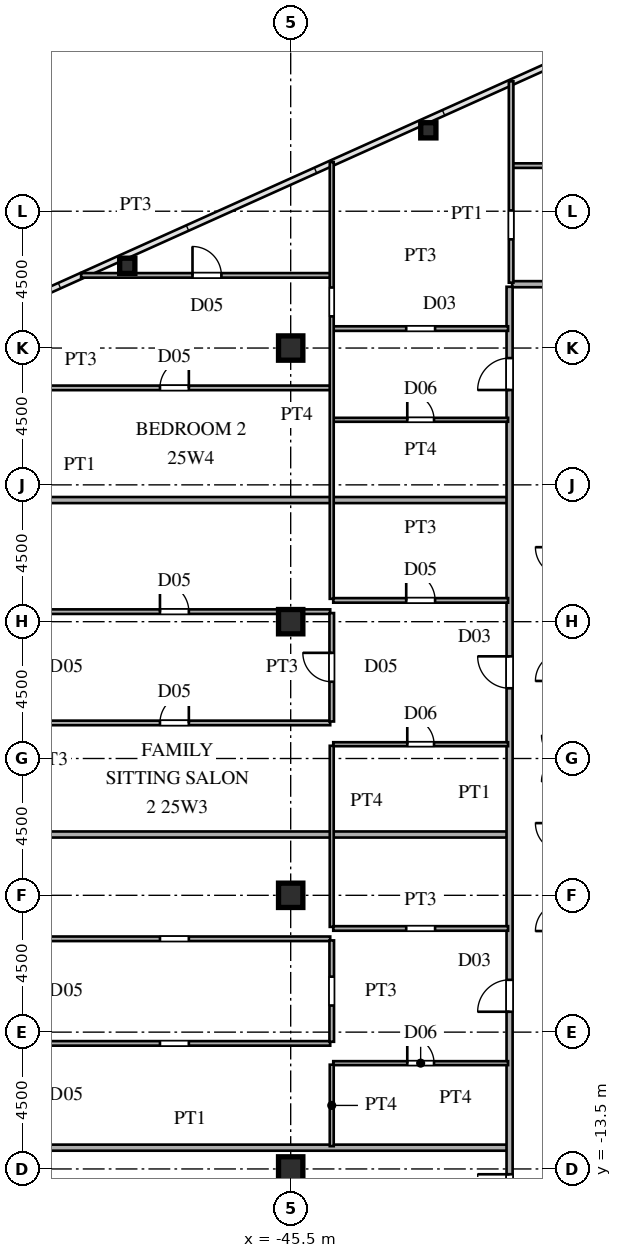
"""IFC4 building model, lengths in metres.
Left out: names, types, materials, properties, quantities, classifications, styles, units other than length and angle.
Written with IfcOpenShell. Run it as: python <this file> out.ifc"""

import sys

from ifc_helpers import new_model, si_unit, direction, frame, frame_2d, origin, origin_2d, place, context, subcontext, project, spatial, rectangle, hollow_rectangle, i_section, extrude, source, transform, mapped, element, fill, save


model = new_model("IFC4")
c1 = context("Model", 3, precision=1e-05, world=origin(), true_north=direction((0.0, 1.0)))
c2 = subcontext(c1, "Body", "Model", "MODEL_VIEW")
j1 = project(units=[si_unit("LENGTHUNIT", "METRE"), si_unit("PLANEANGLEUNIT", "RADIAN")], contexts=[c1])
p1 = place(None, origin())
s1 = spatial("IfcSite", under=j1, at=p1, CompositionType="ELEMENT")
p2 = place(p1, origin())
s2 = spatial("IfcBuilding", under=s1, at=p2, CompositionType="ELEMENT")
p3 = place(p2, frame((0.0, 0.0, 96.0)))
s3 = spatial("IfcBuildingStorey", under=s2, at=p3, CompositionType="ELEMENT", Elevation=96.0)
m1 = source(origin(), c2, "Body", "SweptSolid", [
    extrude(i_section(OverallWidth=0.8, OverallDepth=0.8, WebThickness=0.032, FlangeThickness=0.05, at=origin_2d()), origin(), (0.0, 0.0, 1.0), 3.6),
])
for number, where, z_axis, x_axis in (
    (1, (-45.5, -13.5, 0.0), (0.0, 0.0, 1.0), (1.0, 0.0, 0.0)),
    (2, (-45.5, -4.5, 0.0), (0.0, 0.0, 1.0), (1.0, 0.0, 0.0)),
    (3, (-45.5, 4.5, 0.0), (0.0, 0.0, 1.0), (1.0, 0.0, 0.0)),
    (4, (-45.5, 13.5, 0.0), (0.0, 0.0, 1.0), (1.0, 0.0, 0.0)),
):
    element("IfcColumn", number, at=place(p3, frame(where, z_axis=z_axis, x_axis=x_axis)), inside=s3, PredefinedType="COLUMN", context=c2, shape_type="MappedRepresentation", body=[
        mapped(m1, transform((0.0, 0.0, 0.0), scale=1.0)),
    ])
m2 = source(origin(), c2, "Body", "SweptSolid", [
    extrude(hollow_rectangle(XDim=0.5, YDim=0.5, WallThickness=0.02, at=origin_2d()), origin(), (0.0, 0.0, 1.0), 3.6),
])
for number, where, z_axis, x_axis in (
    (5, (-40.973, 20.661, 0.0), (0.0, 0.0, 1.0), (1.0, 0.0, 0.0)),
    (6, (-50.875, 16.205, 0.0), (0.0, 0.0, 1.0), (1.0, 0.0, 0.0)),
):
    element("IfcColumn", number, at=place(p3, frame(where, z_axis=z_axis, x_axis=x_axis)), inside=s3, PredefinedType="COLUMN", context=c2, shape_type="MappedRepresentation", body=[
        mapped(m2, transform((0.0, 0.0, 0.0), scale=1.0)),
    ])
p4 = place(p3, frame((-59.234, -12.8, 0.0), z_axis=(0.0, 0.0, 1.0), x_axis=(1.0, 0.0, 0.0)))
e7 = element("IfcWall", 7, at=p4, inside=s3, PredefinedType="PARTITIONING", context=c2, shape_type="SweptSolid", body=[
    extrude(rectangle(XDim=20.854, YDim=0.2, at=frame_2d((10.427, 0.0))), origin(), (0.0, 0.0, 1.0), 3.38),
])
p5 = place(p3, frame((-44.1, -10.02, 0.0), z_axis=(0.0, 0.0, 1.0), x_axis=(1.0, 0.0, 0.0)))
e8 = element("IfcWall", 8, at=p5, inside=s3, PredefinedType="PARTITIONING", context=c2, shape_type="SweptSolid", body=[
    extrude(rectangle(XDim=5.75, YDim=0.13, at=frame_2d((2.875, 0.0))), origin(), (0.0, 0.0, 1.0), 3.38),
])
p6 = place(p5, frame((2.435, 0.0, 0.0)))
e9 = element("IfcOpeningElement", 9, at=p6, cuts=e8, PredefinedType="OPENING", context=c2, shape_type="SweptSolid", body=[
    extrude(rectangle(XDim=0.88, YDim=2.1, at=frame_2d((0.44, 1.05))), frame((0.0, 0.075, 0.0), z_axis=(0.0, -1.0, 0.0), x_axis=(1.0, 0.0, 0.0)), (0.0, 0.0, 1.0), 0.15),
])
p7 = place(p3, frame((-66.887, -9.37, 0.0), z_axis=(0.0, 0.0, 1.0), x_axis=(1.0, 0.0, 0.0)))
e10 = element("IfcWall", 10, at=p7, inside=s3, PredefinedType="PARTITIONING", context=c2, shape_type="SweptSolid", body=[
    extrude(rectangle(XDim=22.687, YDim=0.15, at=frame_2d((11.344, 0.0))), origin(), (0.0, 0.0, 1.0), 3.38),
])
p8 = place(p7, frame((17.087, 0.0, 0.0)))
e11 = element("IfcOpeningElement", 11, at=p8, cuts=e10, PredefinedType="OPENING", context=c2, shape_type="SweptSolid", body=[
    extrude(rectangle(XDim=0.95, YDim=2.15, at=frame_2d((0.475, 1.075))), frame((0.0, 0.085, 0.0), z_axis=(0.0, -1.0, 0.0), x_axis=(1.0, 0.0, 0.0)), (0.0, 0.0, 1.0), 0.17),
])
p9 = place(p3, frame((-71.035, -5.93, 0.0), z_axis=(0.0, 0.0, 1.0), x_axis=(1.0, 0.0, 0.0)))
e12 = element("IfcWall", 12, at=p9, inside=s3, PredefinedType="PARTITIONING", context=c2, shape_type="SweptSolid", body=[
    extrude(rectangle(XDim=26.835, YDim=0.15, at=frame_2d((13.417, 0.0))), origin(), (0.0, 0.0, 1.0), 3.38),
])
p10 = place(p9, frame((21.235, 0.0, 0.0)))
e13 = element("IfcOpeningElement", 13, at=p10, cuts=e12, PredefinedType="OPENING", context=c2, shape_type="SweptSolid", body=[
    extrude(rectangle(XDim=0.95, YDim=2.15, at=frame_2d((0.475, 1.075))), frame((0.0, 0.085, 0.0), z_axis=(0.0, -1.0, 0.0), x_axis=(1.0, 0.0, 0.0)), (0.0, 0.0, 1.0), 0.17),
])
p11 = place(p3, frame((-44.1, -5.59, 0.0), z_axis=(0.0, 0.0, 1.0), x_axis=(1.0, 0.0, 0.0)))
e14 = element("IfcWall", 14, at=p11, inside=s3, PredefinedType="PARTITIONING", context=c2, shape_type="SweptSolid", body=[
    extrude(rectangle(XDim=5.75, YDim=0.15, at=frame_2d((2.875, 0.0))), origin(), (0.0, 0.0, 1.0), 3.38),
])
p12 = place(p11, frame((2.4, 0.0, 0.0)))
e15 = element("IfcOpeningElement", 15, at=p12, cuts=e14, PredefinedType="OPENING", context=c2, shape_type="SweptSolid", body=[
    extrude(rectangle(XDim=0.95, YDim=2.15, at=frame_2d((0.475, 1.075))), frame((0.0, 0.085, 0.0), z_axis=(0.0, -1.0, 0.0), x_axis=(1.0, 0.0, 0.0)), (0.0, 0.0, 1.0), 0.17),
])
p13 = place(p3, frame((-71.005, -2.5, 0.0), z_axis=(0.0, 0.0, 1.0), x_axis=(1.0, 0.0, 0.0)))
e16 = element("IfcWall", 16, at=p13, inside=s3, PredefinedType="PARTITIONING", context=c2, shape_type="SweptSolid", body=[
    extrude(rectangle(XDim=32.625, YDim=0.2, at=frame_2d((16.312, 0.0))), origin(), (0.0, 0.0, 1.0), 3.38),
])
p14 = place(p3, frame((-44.1, 0.47, 0.0), z_axis=(0.0, 0.0, 1.0), x_axis=(1.0, 0.0, 0.0)))
e17 = element("IfcWall", 17, at=p14, inside=s3, PredefinedType="PARTITIONING", context=c2, shape_type="SweptSolid", body=[
    extrude(rectangle(XDim=5.75, YDim=0.13, at=frame_2d((2.875, 0.0))), origin(), (0.0, 0.0, 1.0), 3.38),
])
p15 = place(p14, frame((2.435, 0.0, 0.0)))
e18 = element("IfcOpeningElement", 18, at=p15, cuts=e17, PredefinedType="OPENING", context=c2, shape_type="SweptSolid", body=[
    extrude(rectangle(XDim=0.88, YDim=2.1, at=frame_2d((0.44, 1.05))), frame((0.0, 0.075, 0.0), z_axis=(0.0, -1.0, 0.0), x_axis=(1.0, 0.0, 0.0)), (0.0, 0.0, 1.0), 0.15),
])
p16 = place(p3, frame((-71.035, 1.17, 0.0), z_axis=(0.0, 0.0, 1.0), x_axis=(1.0, 0.0, 0.0)))
e19 = element("IfcWall", 19, at=p16, inside=s3, PredefinedType="PARTITIONING", context=c2, shape_type="SweptSolid", body=[
    extrude(rectangle(XDim=26.835, YDim=0.15, at=frame_2d((13.417, 0.0))), origin(), (0.0, 0.0, 1.0), 3.38),
])
p17 = place(p16, frame((21.235, 0.0, 0.0)))
e20 = element("IfcOpeningElement", 20, at=p17, cuts=e19, PredefinedType="OPENING", context=c2, shape_type="SweptSolid", body=[
    extrude(rectangle(XDim=0.95, YDim=2.15, at=frame_2d((0.475, 1.075))), frame((0.0, 0.085, 0.0), z_axis=(0.0, -1.0, 0.0), x_axis=(1.0, 0.0, 0.0)), (0.0, 0.0, 1.0), 0.17),
])
p18 = place(p16, frame((13.21, 0.0, 0.0)))
e21 = element("IfcOpeningElement", 21, at=p18, cuts=e19, PredefinedType="OPENING", context=c2, shape_type="SweptSolid", body=[
    extrude(rectangle(XDim=0.95, YDim=2.15, at=frame_2d((0.475, 1.075))), frame((0.0, 0.085, 0.0), z_axis=(0.0, -1.0, 0.0), x_axis=(1.0, 0.0, 0.0)), (0.0, 0.0, 1.0), 0.17),
])
p19 = place(p3, frame((-71.035, 4.83, 0.0), z_axis=(0.0, 0.0, 1.0), x_axis=(1.0, 0.0, 0.0)))
e22 = element("IfcWall", 22, at=p19, inside=s3, PredefinedType="PARTITIONING", context=c2, shape_type="SweptSolid", body=[
    extrude(rectangle(XDim=26.835, YDim=0.15, at=frame_2d((13.417, 0.0))), origin(), (0.0, 0.0, 1.0), 3.38),
])
p20 = place(p19, frame((21.235, 0.0, 0.0)))
e23 = element("IfcOpeningElement", 23, at=p20, cuts=e22, PredefinedType="OPENING", context=c2, shape_type="SweptSolid", body=[
    extrude(rectangle(XDim=0.95, YDim=2.15, at=frame_2d((0.475, 1.075))), frame((0.0, 0.085, 0.0), z_axis=(0.0, -1.0, 0.0), x_axis=(1.0, 0.0, 0.0)), (0.0, 0.0, 1.0), 0.17),
])
p21 = place(p19, frame((13.21, 0.0, 0.0)))
e24 = element("IfcOpeningElement", 24, at=p21, cuts=e22, PredefinedType="OPENING", context=c2, shape_type="SweptSolid", body=[
    extrude(rectangle(XDim=0.95, YDim=2.15, at=frame_2d((0.475, 1.075))), frame((0.0, 0.085, 0.0), z_axis=(0.0, -1.0, 0.0), x_axis=(1.0, 0.0, 0.0)), (0.0, 0.0, 1.0), 0.17),
])
p22 = place(p3, frame((-44.1, 5.2, 0.0), z_axis=(0.0, 0.0, 1.0), x_axis=(1.0, 0.0, 0.0)))
e25 = element("IfcWall", 25, at=p22, inside=s3, PredefinedType="PARTITIONING", context=c2, shape_type="SweptSolid", body=[
    extrude(rectangle(XDim=5.75, YDim=0.15, at=frame_2d((2.875, 0.0))), origin(), (0.0, 0.0, 1.0), 3.38),
])
p23 = place(p22, frame((2.4, 0.0, 0.0)))
e26 = element("IfcOpeningElement", 26, at=p23, cuts=e25, PredefinedType="OPENING", context=c2, shape_type="SweptSolid", body=[
    extrude(rectangle(XDim=0.95, YDim=2.15, at=frame_2d((0.475, 1.075))), frame((0.0, 0.085, 0.0), z_axis=(0.0, -1.0, 0.0), x_axis=(1.0, 0.0, 0.0)), (0.0, 0.0, 1.0), 0.17),
])
p24 = place(p3, frame((-68.79, 8.5, 0.0), z_axis=(0.0, 0.0, 1.0), x_axis=(1.0, 0.0, 0.0)))
e27 = element("IfcWall", 27, at=p24, inside=s3, PredefinedType="PARTITIONING", context=c2, shape_type="SweptSolid", body=[
    extrude(rectangle(XDim=30.41, YDim=0.2, at=frame_2d((15.205, 0.0))), origin(), (0.0, 0.0, 1.0), 3.38),
])
p25 = place(p3, frame((-44.1, 11.14, 0.0), z_axis=(0.0, 0.0, 1.0), x_axis=(1.0, 0.0, 0.0)))
e28 = element("IfcWall", 28, at=p25, inside=s3, PredefinedType="PARTITIONING", context=c2, shape_type="SweptSolid", body=[
    extrude(rectangle(XDim=5.75, YDim=0.13, at=frame_2d((2.875, 0.0))), origin(), (0.0, 0.0, 1.0), 3.38),
])
p26 = place(p25, frame((2.435, 0.0, 0.0)))
e29 = element("IfcOpeningElement", 29, at=p26, cuts=e28, PredefinedType="OPENING", context=c2, shape_type="SweptSolid", body=[
    extrude(rectangle(XDim=0.88, YDim=2.1, at=frame_2d((0.44, 1.05))), frame((0.0, 0.075, 0.0), z_axis=(0.0, -1.0, 0.0), x_axis=(1.0, 0.0, 0.0)), (0.0, 0.0, 1.0), 0.15),
])
p27 = place(p3, frame((-60.603, 12.19, 0.0), z_axis=(0.0, 0.0, 1.0), x_axis=(1.0, 0.0, 0.0)))
e30 = element("IfcWall", 30, at=p27, inside=s3, PredefinedType="PARTITIONING", context=c2, shape_type="SweptSolid", body=[
    extrude(rectangle(XDim=16.403, YDim=0.15, at=frame_2d((8.202, 0.0))), origin(), (0.0, 0.0, 1.0), 3.38),
])
p28 = place(p27, frame((10.803, 0.0, 0.0)))
e31 = element("IfcOpeningElement", 31, at=p28, cuts=e30, PredefinedType="OPENING", context=c2, shape_type="SweptSolid", body=[
    extrude(rectangle(XDim=0.95, YDim=2.15, at=frame_2d((0.475, 1.075))), frame((0.0, 0.085, 0.0), z_axis=(0.0, -1.0, 0.0), x_axis=(1.0, 0.0, 0.0)), (0.0, 0.0, 1.0), 0.17),
])
p29 = place(p27, frame((2.594, 0.0, 0.0)))
e32 = element("IfcOpeningElement", 32, at=p29, cuts=e30, PredefinedType="OPENING", context=c2, shape_type="SweptSolid", body=[
    extrude(rectangle(XDim=0.95, YDim=2.15, at=frame_2d((0.475, 1.075))), frame((0.0, 0.085, 0.0), z_axis=(0.0, -1.0, 0.0), x_axis=(1.0, 0.0, 0.0)), (0.0, 0.0, 1.0), 0.17),
])
p30 = place(p3, frame((-44.1, 14.14, 0.0), z_axis=(0.0, 0.0, 1.0), x_axis=(1.0, 0.0, 0.0)))
e33 = element("IfcWall", 33, at=p30, inside=s3, PredefinedType="PARTITIONING", context=c2, shape_type="SweptSolid", body=[
    extrude(rectangle(XDim=5.75, YDim=0.15, at=frame_2d((2.875, 0.0))), origin(), (0.0, 0.0, 1.0), 3.38),
])
p31 = place(p30, frame((2.4, 0.0, 0.0)))
e34 = element("IfcOpeningElement", 34, at=p31, cuts=e33, PredefinedType="OPENING", context=c2, shape_type="SweptSolid", body=[
    extrude(rectangle(XDim=0.95, YDim=2.15, at=frame_2d((0.475, 1.075))), frame((0.0, 0.085, 0.0), z_axis=(0.0, -1.0, 0.0), x_axis=(1.0, 0.0, 0.0)), (0.0, 0.0, 1.0), 0.17),
])
p32 = place(p3, frame((-38.215, 15.6, 0.0), z_axis=(0.0, 0.0, 1.0), x_axis=(1.0, 0.0, 0.0)))
e35 = element("IfcWall", 35, at=p32, inside=s3, PredefinedType="PARTITIONING", context=c2, shape_type="SweptSolid", body=[
    extrude(rectangle(XDim=1.63, YDim=0.2, at=frame_2d((0.815, 0.0))), origin(), (0.0, 0.0, 1.0), 3.38),
])
p33 = place(p3, frame((-52.394, 15.89, 0.0), z_axis=(0.0, 0.0, 1.0), x_axis=(1.0, 0.0, 0.0)))
e36 = element("IfcWall", 36, at=p33, inside=s3, PredefinedType="PARTITIONING", context=c2, shape_type="SweptSolid", body=[
    extrude(rectangle(XDim=8.194, YDim=0.15, at=frame_2d((4.097, 0.0))), origin(), (0.0, 0.0, 1.0), 3.38),
])
p34 = place(p33, frame((3.664, 0.0, 0.0)))
e37 = element("IfcOpeningElement", 37, at=p34, cuts=e36, PredefinedType="OPENING", context=c2, shape_type="SweptSolid", body=[
    extrude(rectangle(XDim=0.95, YDim=2.15, at=frame_2d((0.475, 1.075))), frame((0.0, 0.085, 0.0), z_axis=(0.0, -1.0, 0.0), x_axis=(1.0, 0.0, 0.0)), (0.0, 0.0, 1.0), 0.17),
])
p35 = place(p3, frame((-38.2, 19.5, 0.0), z_axis=(0.0, 0.0, 1.0), x_axis=(1.0, 0.0, 0.0)))
e38 = element("IfcWall", 38, at=p35, inside=s3, PredefinedType="PARTITIONING", context=c2, shape_type="SweptSolid", body=[
    extrude(rectangle(XDim=10.735, YDim=0.15, at=frame_2d((5.367, 0.0))), origin(), (0.0, 0.0, 1.0), 3.38),
])
p36 = place(p35, frame((4.85, 0.0, 0.0)))
e39 = element("IfcOpeningElement", 39, at=p36, cuts=e38, PredefinedType="OPENING", context=c2, shape_type="SweptSolid", body=[
    extrude(rectangle(XDim=0.95, YDim=2.15, at=frame_2d((0.475, 1.075))), frame((0.0, 0.085, 0.0), z_axis=(0.0, -1.0, 0.0), x_axis=(1.0, 0.0, 0.0)), (0.0, 0.0, 1.0), 0.17),
])
p37 = place(p3, frame((-44.15, -12.75, 0.0), z_axis=(0.0, 0.0, 1.0), x_axis=(0.0, 1.0, 0.0)))
e40 = element("IfcWall", 40, at=p37, inside=s3, PredefinedType="PARTITIONING", context=c2, shape_type="SweptSolid", body=[
    extrude(rectangle(XDim=2.679, YDim=0.13, at=frame_2d((1.339, 0.0))), origin(), (0.0, 0.0, 1.0), 3.38),
])
p38 = place(p3, frame((-44.15, -9.317, 0.0), z_axis=(0.0, 0.0, 1.0), x_axis=(0.0, 1.0, 0.0)))
e41 = element("IfcWall", 41, at=p38, inside=s3, PredefinedType="PARTITIONING", context=c2, shape_type="SweptSolid", body=[
    extrude(rectangle(XDim=3.334, YDim=0.15, at=frame_2d((1.667, 0.0))), origin(), (0.0, 0.0, 1.0), 3.38),
])
p39 = place(p38, frame((1.192, 0.0, 0.0)))
e42 = element("IfcOpeningElement", 42, at=p39, cuts=e41, PredefinedType="OPENING", context=c2, shape_type="SweptSolid", body=[
    extrude(rectangle(XDim=0.95, YDim=2.15, at=frame_2d((0.475, 1.075))), frame((0.0, 0.085, 0.0), z_axis=(0.0, -1.0, 0.0), x_axis=(1.0, 0.0, 0.0)), (0.0, 0.0, 1.0), 0.17),
])
p40 = place(p3, frame((-44.15, -5.538, 0.0), z_axis=(0.0, 0.0, 1.0), x_axis=(0.0, 1.0, 0.0)))
e43 = element("IfcWall", 43, at=p40, inside=s3, PredefinedType="PARTITIONING", context=c2, shape_type="SweptSolid", body=[
    extrude(rectangle(XDim=5.956, YDim=0.13, at=frame_2d((2.978, 0.0))), origin(), (0.0, 0.0, 1.0), 3.38),
])
p41 = place(p3, frame((-44.15, 1.217, 0.0), z_axis=(0.0, 0.0, 1.0), x_axis=(0.0, 1.0, 0.0)))
e44 = element("IfcWall", 44, at=p41, inside=s3, PredefinedType="PARTITIONING", context=c2, shape_type="SweptSolid", body=[
    extrude(rectangle(XDim=3.566, YDim=0.15, at=frame_2d((1.783, 0.0))), origin(), (0.0, 0.0, 1.0), 3.38),
])
p42 = place(p41, frame((1.308, 0.0, 0.0)))
e45 = element("IfcOpeningElement", 45, at=p42, cuts=e44, PredefinedType="OPENING", context=c2, shape_type="SweptSolid", body=[
    extrude(rectangle(XDim=0.95, YDim=2.15, at=frame_2d((0.475, 1.075))), frame((0.0, 0.085, 0.0), z_axis=(0.0, -1.0, 0.0), x_axis=(1.0, 0.0, 0.0)), (0.0, 0.0, 1.0), 0.17),
])
p43 = place(p3, frame((-44.15, 5.252, 0.0), z_axis=(0.0, 0.0, 1.0), x_axis=(0.0, 1.0, 0.0)))
e46 = element("IfcWall", 46, at=p43, inside=s3, PredefinedType="PARTITIONING", context=c2, shape_type="SweptSolid", body=[
    extrude(rectangle(XDim=14.365, YDim=0.13, at=frame_2d((7.183, 0.0))), origin(), (0.0, 0.0, 1.0), 3.38),
])
p44 = place(p43, frame((9.29, 0.0, 0.0)))
e47 = element("IfcOpeningElement", 47, at=p44, cuts=e46, PredefinedType="OPENING", context=c2, shape_type="SweptSolid", body=[
    extrude(rectangle(XDim=0.95, YDim=2.15, at=frame_2d((0.475, 1.075))), frame((0.0, 0.075, 0.0), z_axis=(0.0, -1.0, 0.0), x_axis=(1.0, 0.0, 0.0)), (0.0, 0.0, 1.0), 0.15),
])
p45 = place(p3, frame((-38.3, -15.515, 0.0), z_axis=(0.0, 0.0, 1.0), x_axis=(0.0, 1.0, 0.0)))
e48 = element("IfcWall", 48, at=p45, inside=s3, PredefinedType="PARTITIONING", context=c2, shape_type="SweptSolid", body=[
    extrude(rectangle(XDim=31.03, YDim=0.2, at=frame_2d((15.515, 0.0))), origin(), (0.0, 0.0, 1.0), 3.38),
])
p46 = place(p45, frame((0.79, 0.0, 0.0)))
e49 = element("IfcOpeningElement", 49, at=p46, cuts=e48, PredefinedType="OPENING", context=c2, shape_type="SweptSolid", body=[
    extrude(rectangle(XDim=1.05, YDim=2.25, at=frame_2d((0.525, 1.125))), frame((0.0, 0.11, 0.0), z_axis=(0.0, -1.0, 0.0), x_axis=(1.0, 0.0, 0.0)), (0.0, 0.0, 1.0), 0.22),
])
p47 = place(p45, frame((7.186, 0.0, 0.0)))
e50 = element("IfcOpeningElement", 50, at=p47, cuts=e48, PredefinedType="OPENING", context=c2, shape_type="SweptSolid", body=[
    extrude(rectangle(XDim=1.05, YDim=2.25, at=frame_2d((0.525, 1.125))), frame((0.0, 0.11, 0.0), z_axis=(0.0, -1.0, 0.0), x_axis=(1.0, 0.0, 0.0)), (0.0, 0.0, 1.0), 0.22),
])
p48 = place(p45, frame((17.825, 0.0, 0.0)))
e51 = element("IfcOpeningElement", 51, at=p48, cuts=e48, PredefinedType="OPENING", context=c2, shape_type="SweptSolid", body=[
    extrude(rectangle(XDim=1.05, YDim=2.25, at=frame_2d((0.525, 1.125))), frame((0.0, 0.11, 0.0), z_axis=(0.0, -1.0, 0.0), x_axis=(1.0, 0.0, 0.0)), (0.0, 0.0, 1.0), 0.22),
])
p49 = place(p45, frame((27.635, 0.0, 0.0)))
e52 = element("IfcOpeningElement", 52, at=p49, cuts=e48, PredefinedType="OPENING", context=c2, shape_type="SweptSolid", body=[
    extrude(rectangle(XDim=1.05, YDim=2.25, at=frame_2d((0.525, 1.125))), frame((0.0, 0.11, 0.0), z_axis=(0.0, -1.0, 0.0), x_axis=(1.0, 0.0, 0.0)), (0.0, 0.0, 1.0), 0.22),
])
p50 = place(p3, frame((-38.25, 15.65, 0.0), z_axis=(0.0, 0.0, 1.0), x_axis=(0.0, 1.0, 0.0)))
e53 = element("IfcWall", 53, at=p50, inside=s3, PredefinedType="PARTITIONING", context=c2, shape_type="SweptSolid", body=[
    extrude(rectangle(XDim=6.623, YDim=0.15, at=frame_2d((3.312, 0.0))), origin(), (0.0, 0.0, 1.0), 3.38),
])
p51 = place(p50, frame((1.425, 0.0, 0.0)))
e54 = element("IfcOpeningElement", 54, at=p51, cuts=e53, PredefinedType="OPENING", context=c2, shape_type="SweptSolid", body=[
    extrude(rectangle(XDim=0.95, YDim=2.15, at=frame_2d((0.475, 1.075))), frame((0.0, 0.085, 0.0), z_axis=(0.0, -1.0, 0.0), x_axis=(1.0, 0.0, 0.0)), (0.0, 0.0, 1.0), 0.17),
])
m3 = source(origin(), c2, "Body", "SweptSolid", [
    extrude(rectangle(XDim=0.88, YDim=2.1, at=frame_2d((0.44, 1.05))), frame((0.0, 0.025, 0.0), z_axis=(0.0, -1.0, 0.0), x_axis=(1.0, 0.0, 0.0)), (0.0, 0.0, 1.0), 0.05),
])
p52 = place(p6, origin())
e55 = element("IfcDoor", 55, at=p52, inside=s3, OperationType="SINGLE_SWING_LEFT", PredefinedType="DOOR", context=c2, shape_type="MappedRepresentation", body=[
    mapped(m3, transform((0.0, 0.0, 0.0), scale=1.0)),
])
fill(e9, e55)
p53 = place(p15, origin())
e56 = element("IfcDoor", 56, at=p53, inside=s3, OperationType="SINGLE_SWING_LEFT", PredefinedType="DOOR", context=c2, shape_type="MappedRepresentation", body=[
    mapped(m3, transform((0.0, 0.0, 0.0), scale=1.0)),
])
fill(e18, e56)
m4 = source(origin(), c2, "Body", "SweptSolid", [
    extrude(rectangle(XDim=0.95, YDim=2.15, at=frame_2d((0.475, 1.075))), frame((0.0, 0.025, 0.0), z_axis=(0.0, -1.0, 0.0), x_axis=(1.0, 0.0, 0.0)), (0.0, 0.0, 1.0), 0.05),
])
p54 = place(p17, origin())
e57 = element("IfcDoor", 57, at=p54, inside=s3, OperationType="SINGLE_SWING_RIGHT", PredefinedType="DOOR", context=c2, shape_type="MappedRepresentation", body=[
    mapped(m4, transform((0.0, 0.0, 0.0), scale=1.0)),
])
fill(e20, e57)
p55 = place(p20, origin())
e58 = element("IfcDoor", 58, at=p55, inside=s3, OperationType="SINGLE_SWING_LEFT", PredefinedType="DOOR", context=c2, shape_type="MappedRepresentation", body=[
    mapped(m4, transform((0.0, 0.0, 0.0), scale=1.0)),
])
fill(e23, e58)
p56 = place(p23, origin())
e59 = element("IfcDoor", 59, at=p56, inside=s3, OperationType="SINGLE_SWING_LEFT", PredefinedType="DOOR", context=c2, shape_type="MappedRepresentation", body=[
    mapped(m4, transform((0.0, 0.0, 0.0), scale=1.0)),
])
fill(e26, e59)
p57 = place(p26, origin())
e60 = element("IfcDoor", 60, at=p57, inside=s3, OperationType="SINGLE_SWING_LEFT", PredefinedType="DOOR", context=c2, shape_type="MappedRepresentation", body=[
    mapped(m3, transform((0.0, 0.0, 0.0), scale=1.0)),
])
fill(e29, e60)
p58 = place(p28, origin())
e61 = element("IfcDoor", 61, at=p58, inside=s3, OperationType="SINGLE_SWING_RIGHT", PredefinedType="DOOR", context=c2, shape_type="MappedRepresentation", body=[
    mapped(m4, transform((0.0, 0.0, 0.0), scale=1.0)),
])
fill(e31, e61)
p59 = place(p34, origin())
e62 = element("IfcDoor", 62, at=p59, inside=s3, OperationType="SINGLE_SWING_LEFT", PredefinedType="DOOR", context=c2, shape_type="MappedRepresentation", body=[
    mapped(m4, transform((0.0, 0.0, 0.0), scale=1.0)),
])
fill(e37, e62)
p60 = place(p42, origin())
e63 = element("IfcDoor", 63, at=p60, inside=s3, OperationType="SINGLE_SWING_RIGHT", PredefinedType="DOOR", context=c2, shape_type="MappedRepresentation", body=[
    mapped(m4, transform((0.0, 0.0, 0.0), scale=1.0)),
])
fill(e45, e63)
m5 = source(origin(), c2, "Body", "SweptSolid", [
    extrude(rectangle(XDim=1.05, YDim=2.25, at=frame_2d((0.525, 1.125))), frame((0.0, 0.025, 0.0), z_axis=(0.0, -1.0, 0.0), x_axis=(1.0, 0.0, 0.0)), (0.0, 0.0, 1.0), 0.05),
])
p61 = place(p46, origin())
e64 = element("IfcDoor", 64, at=p61, inside=s3, OperationType="SINGLE_SWING_RIGHT", PredefinedType="DOOR", context=c2, shape_type="MappedRepresentation", body=[
    mapped(m5, transform((0.0, 0.0, 0.0), scale=1.0)),
])
fill(e49, e64)
p62 = place(p47, origin())
e65 = element("IfcDoor", 65, at=p62, inside=s3, OperationType="SINGLE_SWING_LEFT", PredefinedType="DOOR", context=c2, shape_type="MappedRepresentation", body=[
    mapped(m5, transform((0.0, 0.0, 0.0), scale=1.0)),
])
fill(e50, e65)
p63 = place(p48, origin())
e66 = element("IfcDoor", 66, at=p63, inside=s3, OperationType="SINGLE_SWING_RIGHT", PredefinedType="DOOR", context=c2, shape_type="MappedRepresentation", body=[
    mapped(m5, transform((0.0, 0.0, 0.0), scale=1.0)),
])
fill(e51, e66)
p64 = place(p49, origin())
e67 = element("IfcDoor", 67, at=p64, inside=s3, OperationType="SINGLE_SWING_LEFT", PredefinedType="DOOR", context=c2, shape_type="MappedRepresentation", body=[
    mapped(m5, transform((0.0, 0.0, 0.0), scale=1.0)),
])
fill(e52, e67)
save(model, sys.argv[1])
